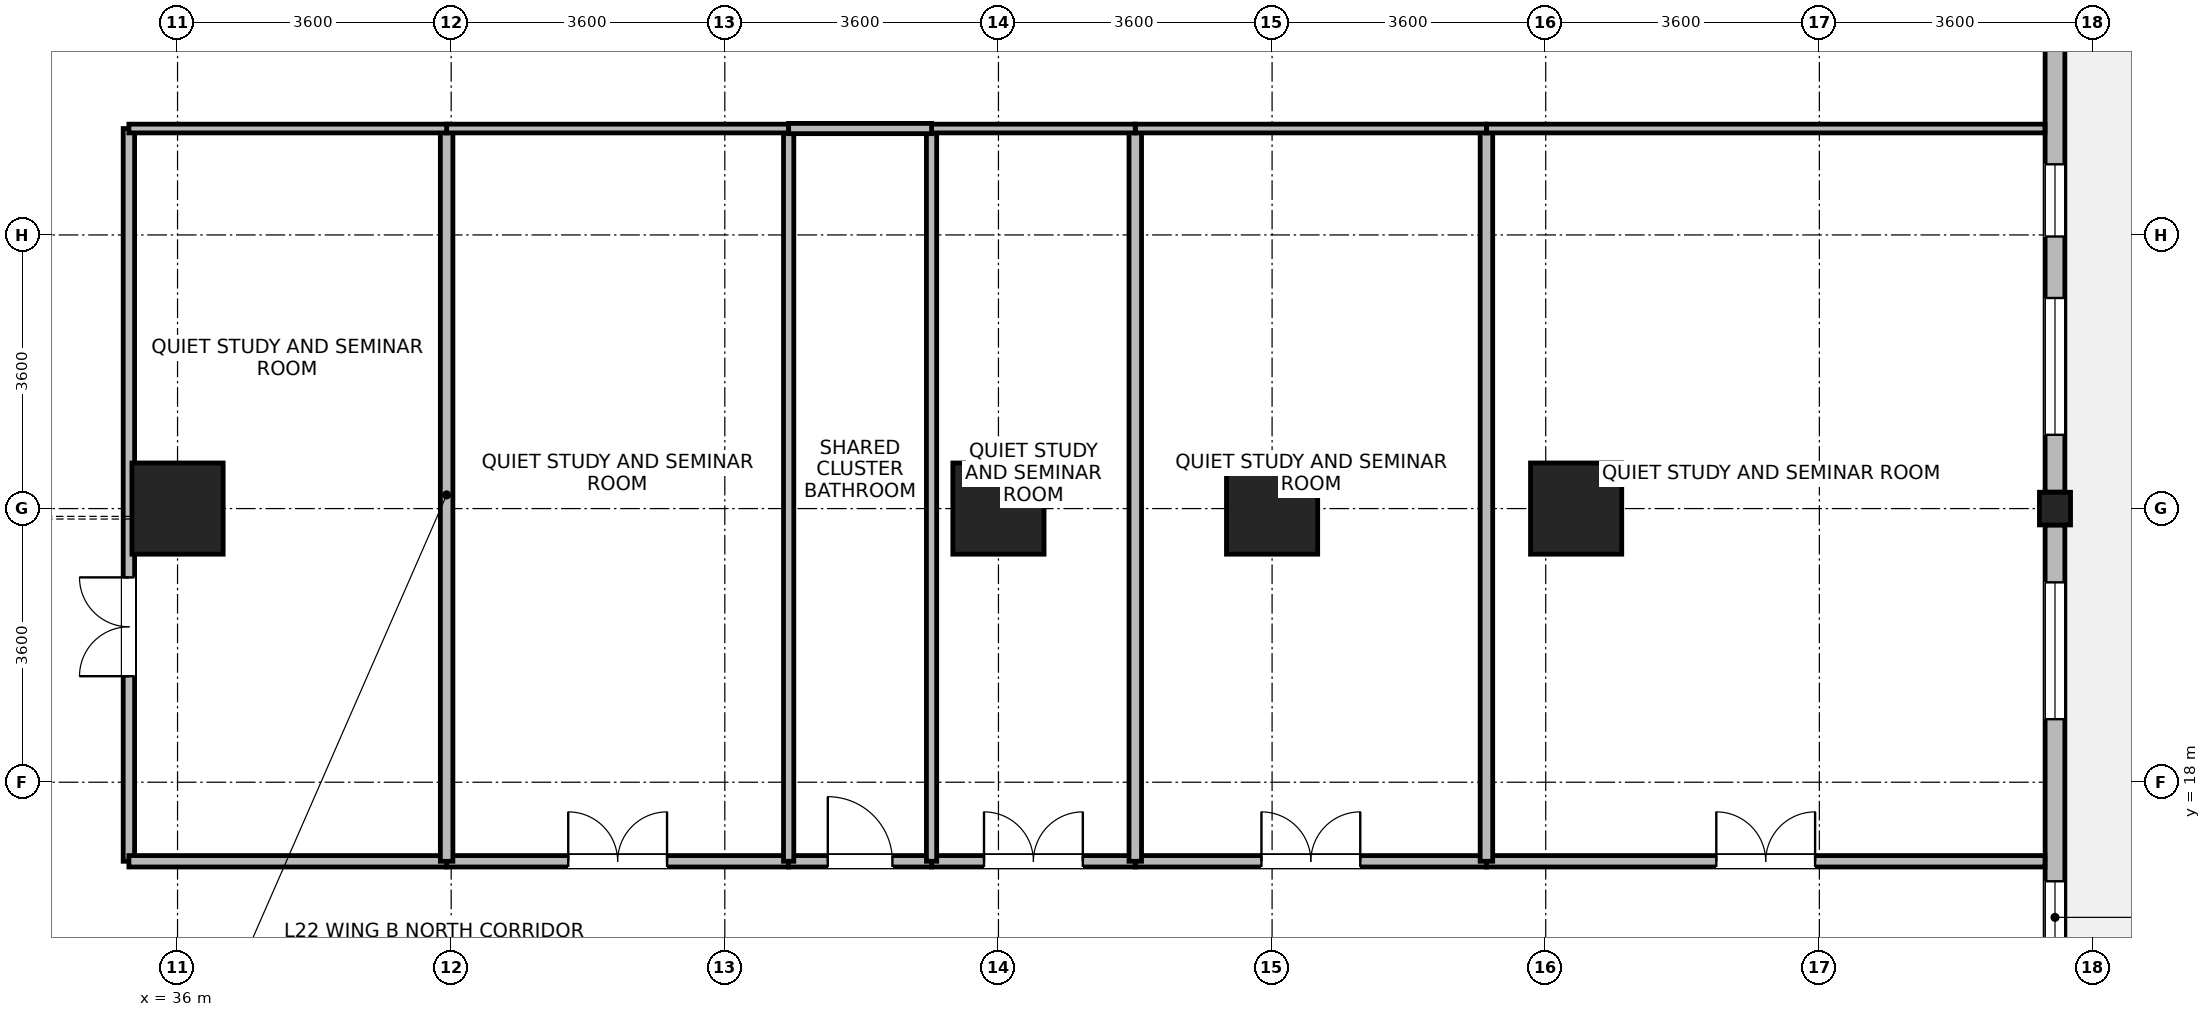
"""IFC4 building model, lengths in metres.
Left out: names, types, materials, properties, quantities, classifications, styles, units other than length and angle.
Written with IfcOpenShell. Run it as: python <this file> out.ifc"""

import sys

from ifc_helpers import new_model, si_unit, direction, frame, frame_2d, origin, origin_2d, place, context, subcontext, project, spatial, rectangle, i_section, extrude, source, transform, mapped, element, fill, save


model = new_model("IFC4")
c1 = context("Model", 3, precision=1e-05, world=origin(), true_north=direction((0.0, 1.0)))
c2 = subcontext(c1, "Body", "Model", "MODEL_VIEW")
j1 = project(units=[si_unit("LENGTHUNIT", "METRE"), si_unit("PLANEANGLEUNIT", "RADIAN")], contexts=[c1])
p1 = place(None, origin())
s1 = spatial("IfcSite", under=j1, at=p1, CompositionType="ELEMENT")
p2 = place(p1, origin())
s2 = spatial("IfcBuilding", under=s1, at=p2, CompositionType="ELEMENT")
p3 = place(p2, frame((0.0, 0.0, 89.7)))
s3 = spatial("IfcBuildingStorey", under=s2, at=p3, CompositionType="ELEMENT", Elevation=89.7)
m1 = source(origin(), c2, "Body", "SweptSolid", [
    extrude(rectangle(XDim=1.2, YDim=1.2, at=origin_2d()), origin(), (0.0, 0.0, 1.0), 3.7),
])
for number, where, z_axis, x_axis in (
    (1, (36.0, 21.6, 0.0), (0.0, 0.0, 1.0), (1.0, 0.0, 0.0)),
    (2, (46.8, 21.6, 0.0), (0.0, 0.0, 1.0), (1.0, 0.0, 0.0)),
    (3, (50.4, 21.6, 0.0), (0.0, 0.0, 1.0), (1.0, 0.0, 0.0)),
    (4, (54.4, 21.6, 0.0), (0.0, 0.0, 1.0), (1.0, 0.0, 0.0)),
):
    element("IfcColumn", number, at=place(p3, frame(where, z_axis=z_axis, x_axis=x_axis)), inside=s3, PredefinedType="COLUMN", context=c2, shape_type="MappedRepresentation", body=[
        mapped(m1, transform((0.0, 0.0, 0.0), x_axis=(1.0, 0.0, 0.0), y_axis=(0.0, 1.0, 0.0), z_axis=(0.0, 0.0, 1.0), scale=1.0)),
    ])
m2 = source(origin(), c2, "Body", "SweptSolid", [
    extrude(i_section(OverallWidth=0.409, OverallDepth=0.43, WebThickness=0.024, FlangeThickness=0.033, FilletRadius=0.015, at=origin_2d()), origin(), (0.0, 0.0, 1.0), 3.7),
])
p4 = place(p3, frame((60.7, 21.6, 0.0), z_axis=(0.0, 0.0, 1.0), x_axis=(1.0, 0.0, 0.0)))
e5 = element("IfcColumn", 5, at=p4, inside=s3, PredefinedType="COLUMN", context=c2, shape_type="MappedRepresentation", body=[
    mapped(m2, transform((0.0, 0.0, 0.0), x_axis=(1.0, 0.0, 0.0), y_axis=(0.0, 1.0, 0.0), z_axis=(0.0, 0.0, 1.0), scale=1.0)),
])
p5 = place(p3, frame((60.7, 21.384, 0.0), z_axis=(0.0, 0.0, 1.0), x_axis=(0.0, -1.0, 0.0)))
e6 = element("IfcWall", 6, at=p5, inside=s3, PredefinedType="STANDARD", context=c2, shape_type="SweptSolid", body=[
    extrude(rectangle(XDim=6.618, YDim=0.26, at=frame_2d((3.309, 0.0))), origin(), (0.0, 0.0, 1.0), 2.93),
])
p6 = place(p5, frame((0.754, 0.0, 0.85)))
e7 = element("IfcOpeningElement", 7, at=p6, cuts=e6, PredefinedType="OPENING", context=c2, shape_type="SweptSolid", body=[
    extrude(rectangle(XDim=1.8, YDim=1.85, at=frame_2d((0.9, 0.925))), frame((0.0, 0.14, 0.0), z_axis=(0.0, -1.0, 0.0), x_axis=(1.0, 0.0, 0.0)), (0.0, 0.0, 1.0), 0.28),
])
p7 = place(p5, frame((4.687, 0.0, 0.85)))
e8 = element("IfcOpeningElement", 8, at=p7, cuts=e6, PredefinedType="OPENING", context=c2, shape_type="SweptSolid", body=[
    extrude(rectangle(XDim=0.95, YDim=1.75, at=frame_2d((0.475, 0.875))), frame((0.0, 0.14, 0.0), z_axis=(0.0, -1.0, 0.0), x_axis=(1.0, 0.0, 0.0)), (0.0, 0.0, 1.0), 0.28),
])
p8 = place(p3, frame((60.7, 28.434, 0.0), z_axis=(0.0, 0.0, 1.0), x_axis=(0.0, -1.0, 0.0)))
e9 = element("IfcWall", 9, at=p8, inside=s3, PredefinedType="STANDARD", context=c2, shape_type="SweptSolid", body=[
    extrude(rectangle(XDim=6.618, YDim=0.26, at=frame_2d((3.309, 0.0))), origin(), (0.0, 0.0, 1.0), 2.93),
])
p9 = place(p8, frame((4.063, 0.0, 0.85)))
e10 = element("IfcOpeningElement", 10, at=p9, cuts=e9, PredefinedType="OPENING", context=c2, shape_type="SweptSolid", body=[
    extrude(rectangle(XDim=1.8, YDim=1.85, at=frame_2d((0.9, 0.925))), frame((0.0, 0.14, 0.0), z_axis=(0.0, -1.0, 0.0), x_axis=(1.0, 0.0, 0.0)), (0.0, 0.0, 1.0), 0.28),
])
p10 = place(p8, frame((2.305, 0.0, 0.85)))
e11 = element("IfcOpeningElement", 11, at=p10, cuts=e9, PredefinedType="OPENING", context=c2, shape_type="SweptSolid", body=[
    extrude(rectangle(XDim=0.95, YDim=1.75, at=frame_2d((0.475, 0.875))), frame((0.0, 0.14, 0.0), z_axis=(0.0, -1.0, 0.0), x_axis=(1.0, 0.0, 0.0)), (0.0, 0.0, 1.0), 0.28),
])
p11 = place(p3, frame((35.36, 16.96, 0.0), z_axis=(0.0, 0.0, 1.0), x_axis=(0.0, 1.0, 0.0)))
e12 = element("IfcWall", 12, at=p11, inside=s3, PredefinedType="PARTITIONING", context=c2, shape_type="SweptSolid", body=[
    extrude(rectangle(XDim=9.64, YDim=0.15, at=frame_2d((4.82, 0.0))), origin(), (0.0, 0.0, 1.0), 3.43),
])
p12 = place(p11, frame((2.435, 0.0, 0.0)))
e13 = element("IfcOpeningElement", 13, at=p12, cuts=e12, PredefinedType="OPENING", context=c2, shape_type="SweptSolid", body=[
    extrude(rectangle(XDim=1.3, YDim=2.12, at=frame_2d((0.65, 1.06))), frame((0.0, 0.085, 0.0), z_axis=(0.0, -1.0, 0.0), x_axis=(1.0, 0.0, 0.0)), (0.0, 0.0, 1.0), 0.17),
])
p13 = place(p3, frame((53.22, 16.96, 0.0), z_axis=(0.0, 0.0, 1.0), x_axis=(1.0, 0.0, 0.0)))
e14 = element("IfcWall", 14, at=p13, inside=s3, PredefinedType="PARTITIONING", context=c2, shape_type="SweptSolid", body=[
    extrude(rectangle(XDim=7.348, YDim=0.15, at=frame_2d((3.674, 0.0))), origin(), (0.0, 0.0, 1.0), 3.43),
])
p14 = place(p13, frame((3.024, 0.0, 0.0)))
e15 = element("IfcOpeningElement", 15, at=p14, cuts=e14, PredefinedType="OPENING", context=c2, shape_type="SweptSolid", body=[
    extrude(rectangle(XDim=1.3, YDim=2.12, at=frame_2d((0.65, 1.06))), frame((0.0, 0.085, 0.0), z_axis=(0.0, -1.0, 0.0), x_axis=(1.0, 0.0, 0.0)), (0.0, 0.0, 1.0), 0.17),
])
p15 = place(p3, frame((48.6, 16.96, 0.0), z_axis=(0.0, 0.0, 1.0), x_axis=(1.0, 0.0, 0.0)))
e16 = element("IfcWall", 16, at=p15, inside=s3, PredefinedType="PARTITIONING", context=c2, shape_type="SweptSolid", body=[
    extrude(rectangle(XDim=4.62, YDim=0.15, at=frame_2d((2.31, 0.0))), origin(), (0.0, 0.0, 1.0), 3.43),
])
p16 = place(p15, frame((1.66, 0.0, 0.0)))
e17 = element("IfcOpeningElement", 17, at=p16, cuts=e16, PredefinedType="OPENING", context=c2, shape_type="SweptSolid", body=[
    extrude(rectangle(XDim=1.3, YDim=2.12, at=frame_2d((0.65, 1.06))), frame((0.0, 0.085, 0.0), z_axis=(0.0, -1.0, 0.0), x_axis=(1.0, 0.0, 0.0)), (0.0, 0.0, 1.0), 0.17),
])
p17 = place(p3, frame((39.54, 16.96, 0.0), z_axis=(0.0, 0.0, 1.0), x_axis=(1.0, 0.0, 0.0)))
e18 = element("IfcWall", 18, at=p17, inside=s3, PredefinedType="PARTITIONING", context=c2, shape_type="SweptSolid", body=[
    extrude(rectangle(XDim=4.5, YDim=0.15, at=frame_2d((2.25, 0.0))), origin(), (0.0, 0.0, 1.0), 3.43),
])
p18 = place(p17, frame((1.6, 0.0, 0.0)))
e19 = element("IfcOpeningElement", 19, at=p18, cuts=e18, PredefinedType="OPENING", context=c2, shape_type="SweptSolid", body=[
    extrude(rectangle(XDim=1.3, YDim=2.12, at=frame_2d((0.65, 1.06))), frame((0.0, 0.085, 0.0), z_axis=(0.0, -1.0, 0.0), x_axis=(1.0, 0.0, 0.0)), (0.0, 0.0, 1.0), 0.17),
])
p19 = place(p3, frame((35.36, 16.96, 0.0), z_axis=(0.0, 0.0, 1.0), x_axis=(1.0, 0.0, 0.0)))
e20 = element("IfcWall", 20, at=p19, inside=s3, PredefinedType="PARTITIONING", context=c2, shape_type="SweptSolid", body=[
    extrude(rectangle(XDim=4.18, YDim=0.15, at=frame_2d((2.09, 0.0))), origin(), (0.0, 0.0, 1.0), 3.43),
])
p20 = place(p3, frame((45.92, 16.96, 0.0), z_axis=(0.0, 0.0, 1.0), x_axis=(1.0, 0.0, 0.0)))
e21 = element("IfcWall", 21, at=p20, inside=s3, PredefinedType="PARTITIONING", context=c2, shape_type="SweptSolid", body=[
    extrude(rectangle(XDim=2.68, YDim=0.15, at=frame_2d((1.34, 0.0))), origin(), (0.0, 0.0, 1.0), 3.43),
])
p21 = place(p20, frame((0.69, 0.0, 0.0)))
e22 = element("IfcOpeningElement", 22, at=p21, cuts=e21, PredefinedType="OPENING", context=c2, shape_type="SweptSolid", body=[
    extrude(rectangle(XDim=1.3, YDim=2.12, at=frame_2d((0.65, 1.06))), frame((0.0, 0.085, 0.0), z_axis=(0.0, -1.0, 0.0), x_axis=(1.0, 0.0, 0.0)), (0.0, 0.0, 1.0), 0.17),
])
p22 = place(p3, frame((44.04, 16.96, 0.0), z_axis=(0.0, 0.0, 1.0), x_axis=(1.0, 0.0, 0.0)))
e23 = element("IfcWall", 23, at=p22, inside=s3, PredefinedType="PARTITIONING", context=c2, shape_type="SweptSolid", body=[
    extrude(rectangle(XDim=1.88, YDim=0.15, at=frame_2d((0.94, 0.0))), origin(), (0.0, 0.0, 1.0), 3.43),
])
p23 = place(p22, frame((0.515, 0.0, 0.0)))
e24 = element("IfcOpeningElement", 24, at=p23, cuts=e23, PredefinedType="OPENING", context=c2, shape_type="SweptSolid", body=[
    extrude(rectangle(XDim=0.85, YDim=2.04, at=frame_2d((0.425, 1.02))), frame((0.0, 0.085, 0.0), z_axis=(0.0, -1.0, 0.0), x_axis=(1.0, 0.0, 0.0)), (0.0, 0.0, 1.0), 0.17),
])
p24 = place(p3, frame((39.54, 16.96, 0.0), z_axis=(0.0, 0.0, 1.0), x_axis=(0.0, 1.0, 0.0)))
e25 = element("IfcWall", 25, at=p24, inside=s3, PredefinedType="PARTITIONING", context=c2, shape_type="SweptSolid", body=[
    extrude(rectangle(XDim=9.64, YDim=0.165, at=frame_2d((4.82, 0.0))), origin(), (0.0, 0.0, 1.0), 3.43),
])
for number, where, z_axis, x_axis in (
    (26, (44.04, 16.96, 0.0), (0.0, 0.0, 1.0), (0.0, 1.0, 0.0)),
    (27, (45.92, 16.96, 0.0), (0.0, 0.0, 1.0), (0.0, 1.0, 0.0)),
):
    element("IfcWall", number, at=place(p3, frame(where, z_axis=z_axis, x_axis=x_axis)), inside=s3, PredefinedType="PARTITIONING", context=c2, shape_type="SweptSolid", body=[
        extrude(rectangle(XDim=9.64, YDim=0.135, at=frame_2d((4.82, 0.0))), origin(), (0.0, 0.0, 1.0), 3.43),
    ])
for number, where, z_axis, x_axis in (
    (28, (48.6, 16.96, 0.0), (0.0, 0.0, 1.0), (0.0, 1.0, 0.0)),
    (29, (53.22, 16.96, 0.0), (0.0, 0.0, 1.0), (0.0, 1.0, 0.0)),
):
    element("IfcWall", number, at=place(p3, frame(where, z_axis=z_axis, x_axis=x_axis)), inside=s3, PredefinedType="PARTITIONING", context=c2, shape_type="SweptSolid", body=[
        extrude(rectangle(XDim=9.64, YDim=0.165, at=frame_2d((4.82, 0.0))), origin(), (0.0, 0.0, 1.0), 3.43),
    ])
p25 = place(p3, frame((53.22, 26.6, 0.0), z_axis=(0.0, 0.0, 1.0), x_axis=(1.0, 0.0, 0.0)))
e30 = element("IfcWall", 30, at=p25, inside=s3, PredefinedType="PARTITIONING", context=c2, shape_type="SweptSolid", body=[
    extrude(rectangle(XDim=7.348, YDim=0.115, at=frame_2d((3.674, 0.0))), origin(), (0.0, 0.0, 1.0), 3.43),
])
p26 = place(p3, frame((48.6, 26.6, 0.0), z_axis=(0.0, 0.0, 1.0), x_axis=(1.0, 0.0, 0.0)))
e31 = element("IfcWall", 31, at=p26, inside=s3, PredefinedType="PARTITIONING", context=c2, shape_type="SweptSolid", body=[
    extrude(rectangle(XDim=4.62, YDim=0.115, at=frame_2d((2.31, 0.0))), origin(), (0.0, 0.0, 1.0), 3.43),
])
p27 = place(p3, frame((39.54, 26.6, 0.0), z_axis=(0.0, 0.0, 1.0), x_axis=(1.0, 0.0, 0.0)))
e32 = element("IfcWall", 32, at=p27, inside=s3, PredefinedType="PARTITIONING", context=c2, shape_type="SweptSolid", body=[
    extrude(rectangle(XDim=4.5, YDim=0.115, at=frame_2d((2.25, 0.0))), origin(), (0.0, 0.0, 1.0), 3.43),
])
p28 = place(p3, frame((35.36, 26.6, 0.0), z_axis=(0.0, 0.0, 1.0), x_axis=(1.0, 0.0, 0.0)))
e33 = element("IfcWall", 33, at=p28, inside=s3, PredefinedType="PARTITIONING", context=c2, shape_type="SweptSolid", body=[
    extrude(rectangle(XDim=4.18, YDim=0.115, at=frame_2d((2.09, 0.0))), origin(), (0.0, 0.0, 1.0), 3.43),
])
p29 = place(p3, frame((45.92, 26.6, 0.0), z_axis=(0.0, 0.0, 1.0), x_axis=(1.0, 0.0, 0.0)))
e34 = element("IfcWall", 34, at=p29, inside=s3, PredefinedType="PARTITIONING", context=c2, shape_type="SweptSolid", body=[
    extrude(rectangle(XDim=2.68, YDim=0.115, at=frame_2d((1.34, 0.0))), origin(), (0.0, 0.0, 1.0), 3.43),
])
p30 = place(p3, frame((44.04, 26.6, 0.0), z_axis=(0.0, 0.0, 1.0), x_axis=(1.0, 0.0, 0.0)))
e35 = element("IfcWall", 35, at=p30, inside=s3, PredefinedType="PARTITIONING", context=c2, shape_type="SweptSolid", body=[
    extrude(rectangle(XDim=1.88, YDim=0.135, at=frame_2d((0.94, 0.0))), origin(), (0.0, 0.0, 1.0), 3.43),
])
p31 = place(p6, origin())
e36 = element("IfcWindow", 36, at=p31, inside=s3, PartitioningType="SINGLE_PANEL", PredefinedType="WINDOW", context=c2, shape_type="SweptSolid", body=[
    extrude(rectangle(XDim=1.8, YDim=1.85, at=frame_2d((0.9, 0.925))), frame((0.0, 0.03, 0.0), z_axis=(0.0, -1.0, 0.0), x_axis=(1.0, 0.0, 0.0)), (0.0, 0.0, 1.0), 0.06),
])
fill(e7, e36)
p32 = place(p7, origin())
e37 = element("IfcWindow", 37, at=p32, inside=s3, PartitioningType="SINGLE_PANEL", PredefinedType="WINDOW", context=c2, shape_type="SweptSolid", body=[
    extrude(rectangle(XDim=0.95, YDim=1.75, at=frame_2d((0.475, 0.875))), frame((0.0, 0.03, 0.0), z_axis=(0.0, -1.0, 0.0), x_axis=(1.0, 0.0, 0.0)), (0.0, 0.0, 1.0), 0.06),
])
fill(e8, e37)
p33 = place(p9, origin())
e38 = element("IfcWindow", 38, at=p33, inside=s3, PartitioningType="SINGLE_PANEL", PredefinedType="WINDOW", context=c2, shape_type="SweptSolid", body=[
    extrude(rectangle(XDim=1.8, YDim=1.85, at=frame_2d((0.9, 0.925))), frame((0.0, 0.03, 0.0), z_axis=(0.0, -1.0, 0.0), x_axis=(1.0, 0.0, 0.0)), (0.0, 0.0, 1.0), 0.06),
])
fill(e10, e38)
p34 = place(p10, origin())
e39 = element("IfcWindow", 39, at=p34, inside=s3, PartitioningType="SINGLE_PANEL", PredefinedType="WINDOW", context=c2, shape_type="SweptSolid", body=[
    extrude(rectangle(XDim=0.95, YDim=1.75, at=frame_2d((0.475, 0.875))), frame((0.0, 0.03, 0.0), z_axis=(0.0, -1.0, 0.0), x_axis=(1.0, 0.0, 0.0)), (0.0, 0.0, 1.0), 0.06),
])
fill(e11, e39)
p35 = place(p12, origin())
e40 = element("IfcDoor", 40, at=p35, inside=s3, OperationType="DOUBLE_DOOR_SINGLE_SWING", PredefinedType="DOOR", context=c2, shape_type="SweptSolid", body=[
    extrude(rectangle(XDim=1.3, YDim=2.12, at=frame_2d((0.65, 1.06))), frame((0.0, 0.025, 0.0), z_axis=(0.0, -1.0, 0.0), x_axis=(1.0, 0.0, 0.0)), (0.0, 0.0, 1.0), 0.05),
])
fill(e13, e40)
p36 = place(p14, origin())
e41 = element("IfcDoor", 41, at=p36, inside=s3, OperationType="DOUBLE_DOOR_SINGLE_SWING", PredefinedType="DOOR", context=c2, shape_type="SweptSolid", body=[
    extrude(rectangle(XDim=1.3, YDim=2.12, at=frame_2d((0.65, 1.06))), frame((0.0, 0.025, 0.0), z_axis=(0.0, -1.0, 0.0), x_axis=(1.0, 0.0, 0.0)), (0.0, 0.0, 1.0), 0.05),
])
fill(e15, e41)
p37 = place(p16, origin())
e42 = element("IfcDoor", 42, at=p37, inside=s3, OperationType="DOUBLE_DOOR_SINGLE_SWING", PredefinedType="DOOR", context=c2, shape_type="SweptSolid", body=[
    extrude(rectangle(XDim=1.3, YDim=2.12, at=frame_2d((0.65, 1.06))), frame((0.0, 0.025, 0.0), z_axis=(0.0, -1.0, 0.0), x_axis=(1.0, 0.0, 0.0)), (0.0, 0.0, 1.0), 0.05),
])
fill(e17, e42)
p38 = place(p18, origin())
e43 = element("IfcDoor", 43, at=p38, inside=s3, OperationType="DOUBLE_DOOR_SINGLE_SWING", PredefinedType="DOOR", context=c2, shape_type="SweptSolid", body=[
    extrude(rectangle(XDim=1.3, YDim=2.12, at=frame_2d((0.65, 1.06))), frame((0.0, 0.025, 0.0), z_axis=(0.0, -1.0, 0.0), x_axis=(1.0, 0.0, 0.0)), (0.0, 0.0, 1.0), 0.05),
])
fill(e19, e43)
p39 = place(p21, origin())
e44 = element("IfcDoor", 44, at=p39, inside=s3, OperationType="DOUBLE_DOOR_SINGLE_SWING", PredefinedType="DOOR", context=c2, shape_type="SweptSolid", body=[
    extrude(rectangle(XDim=1.3, YDim=2.12, at=frame_2d((0.65, 1.06))), frame((0.0, 0.025, 0.0), z_axis=(0.0, -1.0, 0.0), x_axis=(1.0, 0.0, 0.0)), (0.0, 0.0, 1.0), 0.05),
])
fill(e22, e44)
p40 = place(p23, origin())
e45 = element("IfcDoor", 45, at=p40, inside=s3, OperationType="SINGLE_SWING_LEFT", PredefinedType="DOOR", context=c2, shape_type="SweptSolid", body=[
    extrude(rectangle(XDim=0.85, YDim=2.04, at=frame_2d((0.425, 1.02))), frame((0.0, 0.025, 0.0), z_axis=(0.0, -1.0, 0.0), x_axis=(1.0, 0.0, 0.0)), (0.0, 0.0, 1.0), 0.05),
])
fill(e24, e45)
save(model, sys.argv[1])
